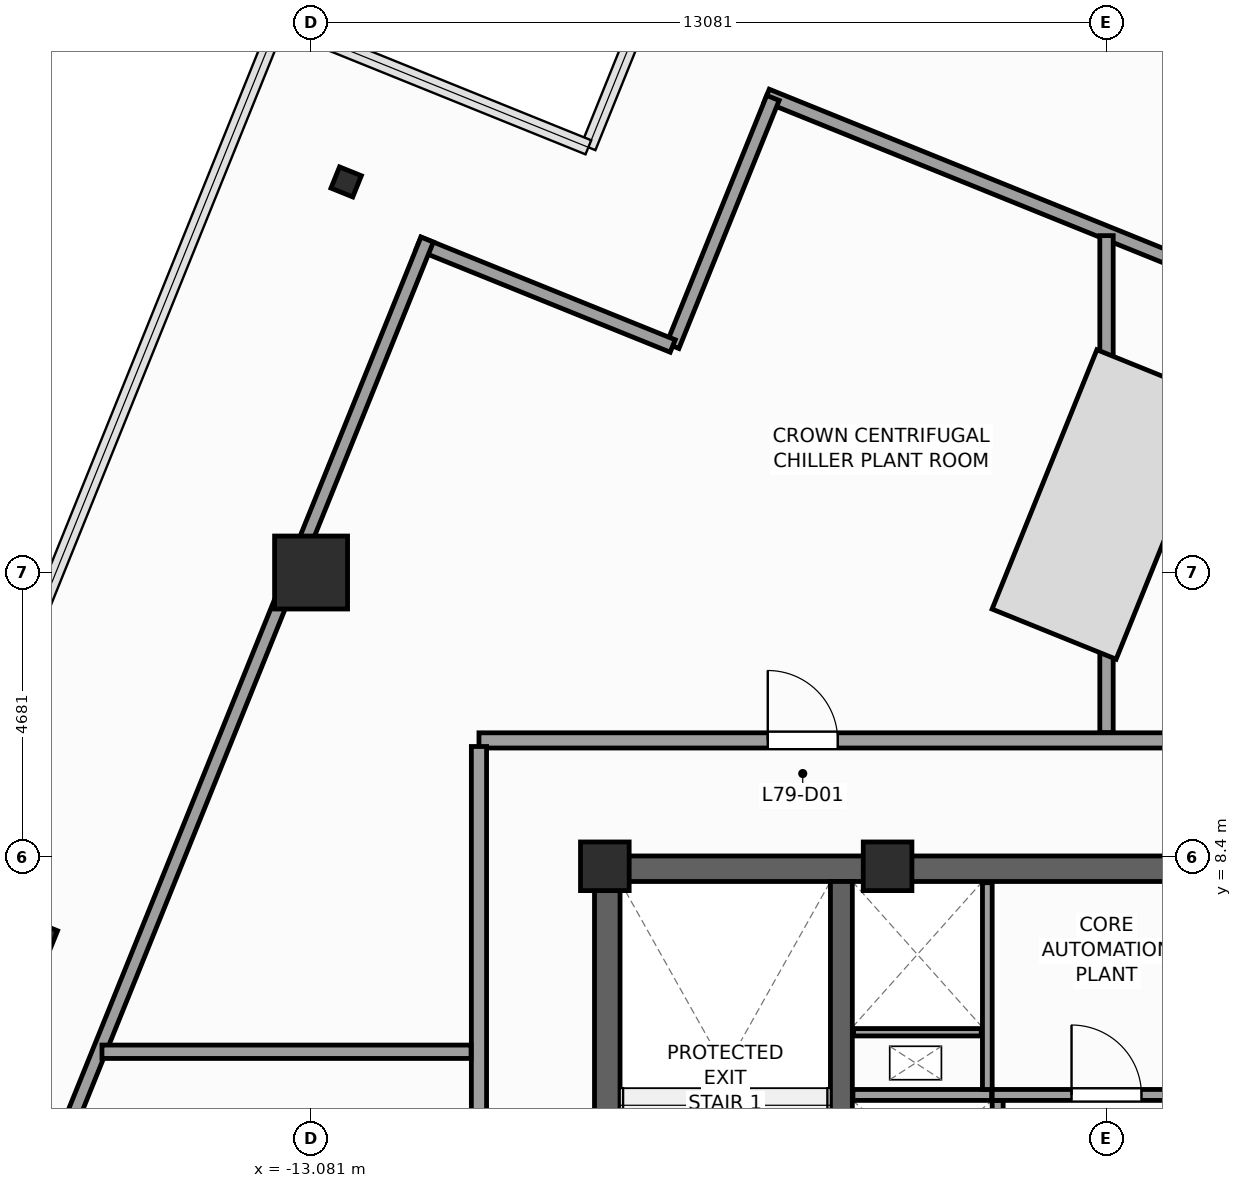
"""IFC4 building model, lengths in metres.
Left out: names, types, materials, properties, quantities, classifications, styles, units other than length and angle.
Written with IfcOpenShell. Run it as: python <this file> out.ifc"""

import sys

from ifc_helpers import new_model, si_unit, direction, frame, frame_2d, origin, origin_2d, place, context, subcontext, project, spatial, rectangle, i_section, extrude, source, transform, mapped, element, fill, save


model = new_model("IFC4")
c1 = context("Model", 3, precision=1e-05, world=origin(), true_north=direction((0.0, 1.0)))
c2 = subcontext(c1, "Body", "Model", "MODEL_VIEW")
j1 = project(units=[si_unit("LENGTHUNIT", "METRE"), si_unit("PLANEANGLEUNIT", "RADIAN")], contexts=[c1])
p1 = place(None, origin())
s1 = spatial("IfcSite", under=j1, at=p1, CompositionType="ELEMENT")
p2 = place(p1, origin())
s2 = spatial("IfcBuilding", under=s1, at=p2, CompositionType="ELEMENT")
p3 = place(p2, frame((0.0, 0.0, 321.6)))
s3 = spatial("IfcBuildingStorey", under=s2, at=p3, CompositionType="ELEMENT", Elevation=321.6)
p4 = place(p3, frame((-8.42, 8.21, 0.0), z_axis=(0.0, 0.0, 1.0), x_axis=(1.0, 0.0, 0.0)))
e1 = element("IfcWall", 1, at=p4, inside=s3, PredefinedType="SHEAR", context=c2, shape_type="SweptSolid", body=[
    extrude(rectangle(XDim=16.84, YDim=0.42, at=frame_2d((8.42, 0.0))), origin(), (0.0, 0.0, 1.0), 4.0),
])
p5 = place(p3, frame((-8.21, -8.0, 0.0), z_axis=(0.0, 0.0, 1.0), x_axis=(0.0, 1.0, 0.0)))
e2 = element("IfcWall", 2, at=p5, inside=s3, PredefinedType="SHEAR", context=c2, shape_type="SweptSolid", body=[
    extrude(rectangle(XDim=16.0, YDim=0.42, at=frame_2d((8.0, 0.0))), origin(), (0.0, 0.0, 1.0), 4.0),
])
p6 = place(p5, frame((4.69, 0.0, 0.0)))
e3 = element("IfcOpeningElement", 3, at=p6, cuts=e2, PredefinedType="OPENING", context=c2, shape_type="SweptSolid", body=[
    extrude(rectangle(XDim=1.3, YDim=2.2, at=frame_2d((0.65, 1.1))), frame((0.0, 0.22, 0.0), z_axis=(0.0, -1.0, 0.0), x_axis=(1.0, 0.0, 0.0)), (0.0, 0.0, 1.0), 0.44),
])
p7 = place(p3, frame((-4.36, -8.0, 0.0), z_axis=(0.0, 0.0, 1.0), x_axis=(0.0, 1.0, 0.0)))
e4 = element("IfcWall", 4, at=p7, inside=s3, PredefinedType="SHEAR", context=c2, shape_type="SweptSolid", body=[
    extrude(rectangle(XDim=16.0, YDim=0.36, at=frame_2d((8.0, 0.0))), origin(), (0.0, 0.0, 1.0), 4.0),
])
m1 = source(origin(), c2, "Body", "SweptSolid", [
    extrude(rectangle(XDim=0.8, YDim=0.8, at=origin_2d()), origin(), (0.0, 0.0, 1.0), 4.0),
])
for number, where, z_axis, x_axis in (
    (5, (-8.25, 8.25, 0.0), (0.0, 0.0, 1.0), (1.0, 0.0, 0.0)),
    (6, (-3.6, 8.25, 0.0), (0.0, 0.0, 1.0), (1.0, 0.0, 0.0)),
):
    element("IfcColumn", number, at=place(p3, frame(where, z_axis=z_axis, x_axis=x_axis)), inside=s3, PredefinedType="PILASTER", context=c2, shape_type="MappedRepresentation", body=[
        mapped(m1, transform((0.0, 0.0, 0.0), scale=1.0)),
    ])
m2 = source(origin(), c2, "Body", "SweptSolid", [
    extrude(rectangle(XDim=1.2, YDim=1.2, at=origin_2d()), origin(), (0.0, 0.0, 1.0), 4.0),
])
p8 = place(p3, frame((-13.081, 13.081, 0.0), z_axis=(0.0, 0.0, 1.0), x_axis=(1.0, 0.0, 0.0)))
e7 = element("IfcColumn", 7, at=p8, inside=s3, PredefinedType="COLUMN", context=c2, shape_type="MappedRepresentation", body=[
    mapped(m2, transform((0.0, 0.0, 0.0), scale=1.0)),
])
m3 = source(origin(), c2, "Body", "SweptSolid", [
    extrude(i_section(OverallWidth=0.376, OverallDepth=0.387, WebThickness=0.02, FlangeThickness=0.032, FilletRadius=0.015, at=origin_2d()), origin(), (0.0, 0.0, 1.0), 4.0),
])
p9 = place(p3, frame((-12.504, 19.504, 0.0), z_axis=(0.0, 0.0, 1.0), x_axis=(0.374606593416, 0.927183854567, 0.0)))
e8 = element("IfcColumn", 8, at=p9, inside=s3, PredefinedType="COLUMN", context=c2, shape_type="MappedRepresentation", body=[
    mapped(m3, transform((0.0, 0.0, 0.0), scale=1.0)),
])
m4 = source(origin(), c2, "Body", "SweptSolid", [
    extrude(i_section(OverallWidth=0.409, OverallDepth=0.425, WebThickness=0.024, FlangeThickness=0.039, FilletRadius=0.015, at=origin_2d()), origin(), (0.0, 0.0, 1.0), 4.0),
])
p10 = place(p3, frame((-17.524, 7.08, 0.0), z_axis=(0.0, 0.0, 1.0), x_axis=(0.374606593416, 0.927183854567, 0.0)))
e9 = element("IfcColumn", 9, at=p10, inside=s3, PredefinedType="COLUMN", context=c2, shape_type="MappedRepresentation", body=[
    mapped(m4, transform((0.0, 0.0, 0.0), scale=1.0)),
])
p11 = place(p3, frame((-1.79, -7.98, 0.0), z_axis=(0.0, 0.0, 1.0), x_axis=(0.0, 1.0, 0.0)))
e10 = element("IfcWall", 10, at=p11, inside=s3, PredefinedType="PARTITIONING", context=c2, shape_type="SweptSolid", body=[
    extrude(rectangle(XDim=12.38, YDim=0.18, at=frame_2d((6.19, 0.0))), origin(), (0.0, 0.0, 1.0), 3.7),
])
p12 = place(p11, frame((3.5, 0.0, 0.0)))
e11 = element("IfcOpeningElement", 11, at=p12, cuts=e10, PredefinedType="OPENING", context=c2, shape_type="SweptSolid", body=[
    extrude(rectangle(XDim=1.15, YDim=2.25, at=frame_2d((0.575, 1.125))), frame((0.0, 0.1, 0.0), z_axis=(0.0, -1.0, 0.0), x_axis=(1.0, 0.0, 0.0)), (0.0, 0.0, 1.0), 0.2),
])
p13 = place(p3, frame((-1.88, 4.49, 0.0), z_axis=(0.0, 0.0, 1.0), x_axis=(1.0, 0.0, 0.0)))
e12 = element("IfcWall", 12, at=p13, inside=s3, PredefinedType="PARTITIONING", context=c2, shape_type="SweptSolid", body=[
    extrude(rectangle(XDim=3.76, YDim=0.18, at=frame_2d((1.88, 0.0))), origin(), (0.0, 0.0, 1.0), 3.7),
])
p14 = place(p13, frame((1.305, 0.0, 0.0)))
e13 = element("IfcOpeningElement", 13, at=p14, cuts=e12, PredefinedType="OPENING", context=c2, shape_type="SweptSolid", body=[
    extrude(rectangle(XDim=1.15, YDim=2.25, at=frame_2d((0.575, 1.125))), frame((0.0, 0.1, 0.0), z_axis=(0.0, -1.0, 0.0), x_axis=(1.0, 0.0, 0.0)), (0.0, 0.0, 1.0), 0.2),
])
p15 = place(p3, frame((-4.17, 4.49, 0.0), z_axis=(0.0, 0.0, 1.0), x_axis=(1.0, 0.0, 0.0)))
e14 = element("IfcWall", 14, at=p15, inside=s3, PredefinedType="PARTITIONING", context=c2, shape_type="SweptSolid", body=[
    extrude(rectangle(XDim=2.28, YDim=0.18, at=frame_2d((1.14, 0.0))), origin(), (0.0, 0.0, 1.0), 3.7),
])
p16 = place(p3, frame((-1.96, 4.58, 0.0), z_axis=(0.0, 0.0, 1.0), x_axis=(0.0, 1.0, 0.0)))
e15 = element("IfcWall", 15, at=p16, inside=s3, PredefinedType="PARTITIONING", context=c2, shape_type="SweptSolid", body=[
    extrude(rectangle(XDim=3.4, YDim=0.16, at=frame_2d((1.7, 0.0))), origin(), (0.0, 0.0, 1.0), 3.7),
])
p17 = place(p3, frame((-4.16, 5.52, 0.0), z_axis=(0.0, 0.0, 1.0), x_axis=(1.0, 0.0, 0.0)))
e16 = element("IfcWall", 16, at=p17, inside=s3, PredefinedType="PARTITIONING", context=c2, shape_type="SweptSolid", body=[
    extrude(rectangle(XDim=2.1, YDim=0.12, at=frame_2d((1.05, 0.0))), origin(), (0.0, 0.0, 1.0), 3.7),
])
p18 = place(p3, frame((18.556, 11.172, 0.0), z_axis=(0.0, 0.0, 1.0), x_axis=(-0.927181788521, 0.374611707018, 0.0)))
e17 = element("IfcWall", 17, at=p18, inside=s3, PredefinedType="PARTITIONING", context=c2, shape_type="SweptSolid", body=[
    extrude(rectangle(XDim=26.04, YDim=0.22, at=frame_2d((13.02, 0.0))), origin(), (0.0, 0.0, 1.0), 3.05),
])
p19 = place(p3, frame((-5.486, 20.886, 0.0), z_axis=(0.0, 0.0, 1.0), x_axis=(-0.374593321469, -0.927189216671, 0.0)))
e18 = element("IfcWall", 18, at=p19, inside=s3, PredefinedType="PARTITIONING", context=c2, shape_type="SweptSolid", body=[
    extrude(rectangle(XDim=4.4, YDim=0.22, at=frame_2d((2.2, 0.0))), origin(), (0.0, 0.0, 1.0), 3.7),
])
p20 = place(p3, frame((-7.134, 16.806, 0.0), z_axis=(0.0, 0.0, 1.0), x_axis=(-0.927186885331, 0.374599091925, 0.0)))
e19 = element("IfcWall", 19, at=p20, inside=s3, PredefinedType="PARTITIONING", context=c2, shape_type="SweptSolid", body=[
    extrude(rectangle(XDim=4.51, YDim=0.22, at=frame_2d((2.255, 0.0))), origin(), (0.0, 0.0, 1.0), 3.7),
])
p21 = place(p3, frame((-11.172, 18.556, 0.0), z_axis=(0.0, 0.0, 1.0), x_axis=(-0.374611707018, -0.927181788521, 0.0)))
e20 = element("IfcWall", 20, at=p21, inside=s3, PredefinedType="PARTITIONING", context=c2, shape_type="SweptSolid", body=[
    extrude(rectangle(XDim=26.04, YDim=0.22, at=frame_2d((13.02, 0.0))), origin(), (0.0, 0.0, 1.0), 3.05),
])
p22 = place(p3, frame((-10.32, 10.32, 0.0), z_axis=(0.0, 0.0, 1.0), x_axis=(1.0, 0.0, 0.0)))
e21 = element("IfcWall", 21, at=p22, inside=s3, PredefinedType="PARTITIONING", context=c2, shape_type="SweptSolid", body=[
    extrude(rectangle(XDim=20.64, YDim=0.25, at=frame_2d((10.32, 0.0))), origin(), (0.0, 0.0, 1.0), 3.7),
])
p23 = place(p22, frame((4.75, 0.0, 0.0)))
e22 = element("IfcOpeningElement", 22, at=p23, cuts=e21, PredefinedType="OPENING", context=c2, shape_type="SweptSolid", body=[
    extrude(rectangle(XDim=1.15, YDim=2.25, at=frame_2d((0.575, 1.125))), frame((0.0, 0.135, 0.0), z_axis=(0.0, -1.0, 0.0), x_axis=(1.0, 0.0, 0.0)), (0.0, 0.0, 1.0), 0.27),
])
p24 = place(p22, frame((14.74, 0.0, 0.0)))
e23 = element("IfcOpeningElement", 23, at=p24, cuts=e21, PredefinedType="OPENING", context=c2, shape_type="SweptSolid", body=[
    extrude(rectangle(XDim=1.15, YDim=2.25, at=frame_2d((0.575, 1.125))), frame((0.0, 0.135, 0.0), z_axis=(0.0, -1.0, 0.0), x_axis=(1.0, 0.0, 0.0)), (0.0, 0.0, 1.0), 0.27),
])
p25 = place(p3, frame((-10.32, -10.22, 0.0), z_axis=(0.0, 0.0, 1.0), x_axis=(0.0, 1.0, 0.0)))
e24 = element("IfcWall", 24, at=p25, inside=s3, PredefinedType="PARTITIONING", context=c2, shape_type="SweptSolid", body=[
    extrude(rectangle(XDim=20.44, YDim=0.25, at=frame_2d((10.22, 0.0))), origin(), (0.0, 0.0, 1.0), 3.7),
])
p26 = place(p25, frame((9.645, 0.0, 0.0)))
e25 = element("IfcOpeningElement", 25, at=p26, cuts=e24, PredefinedType="OPENING", context=c2, shape_type="SweptSolid", body=[
    extrude(rectangle(XDim=1.15, YDim=2.25, at=frame_2d((0.575, 1.125))), frame((0.0, 0.135, 0.0), z_axis=(0.0, -1.0, 0.0), x_axis=(1.0, 0.0, 0.0)), (0.0, 0.0, 1.0), 0.27),
])
p27 = place(p3, frame((0.0, 10.45, 0.0), z_axis=(0.0, 0.0, 1.0), x_axis=(0.0, 1.0, 0.0)))
e26 = element("IfcWall", 26, at=p27, inside=s3, PredefinedType="PARTITIONING", context=c2, shape_type="SweptSolid", body=[
    extrude(rectangle(XDim=8.171, YDim=0.22, at=frame_2d((4.085, 0.0))), origin(), (0.0, 0.0, 1.0), 3.7),
])
p28 = place(p3, frame((-10.45, 5.2, 0.0), z_axis=(0.0, 0.0, 1.0), x_axis=(-1.0, 0.0, 0.0)))
e27 = element("IfcWall", 27, at=p28, inside=s3, PredefinedType="PARTITIONING", context=c2, shape_type="SweptSolid", body=[
    extrude(rectangle(XDim=6.07, YDim=0.22, at=frame_2d((3.035, 0.0))), origin(), (0.0, 0.0, 1.0), 3.7),
])
m5 = source(origin(), c2, "Body", "SweptSolid", [
    extrude(rectangle(XDim=1.15, YDim=2.25, at=frame_2d((0.575, 1.125))), frame((0.0, 0.025, 0.0), z_axis=(0.0, -1.0, 0.0), x_axis=(1.0, 0.0, 0.0)), (0.0, 0.0, 1.0), 0.05),
])
p29 = place(p14, origin())
e28 = element("IfcDoor", 28, at=p29, inside=s3, OperationType="SINGLE_SWING_LEFT", PredefinedType="DOOR", context=c2, shape_type="MappedRepresentation", body=[
    mapped(m5, transform((0.0, 0.0, 0.0), scale=1.0)),
])
fill(e13, e28)
p30 = place(p23, origin())
e29 = element("IfcDoor", 29, at=p30, inside=s3, OperationType="SINGLE_SWING_LEFT", PredefinedType="DOOR", context=c2, shape_type="MappedRepresentation", body=[
    mapped(m5, transform((0.0, 0.0, 0.0), scale=1.0)),
])
fill(e22, e29)
save(model, sys.argv[1])
